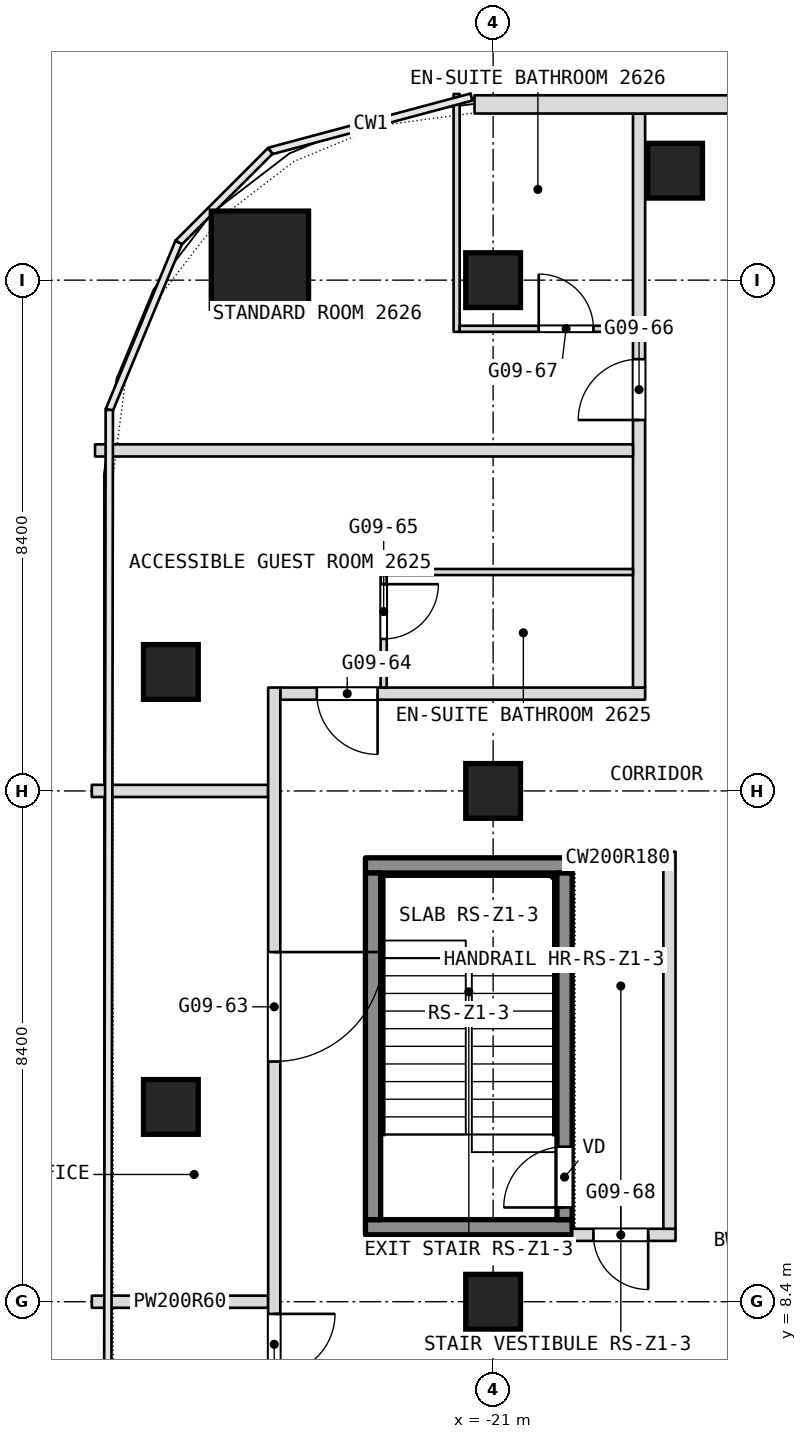
"""IFC4 building model, lengths in metres.
Left out: names, types, materials, properties, quantities, classifications, styles, units other than length and angle.
Written with IfcOpenShell. Run it as: python <this file> out.ifc"""

import sys

from ifc_helpers import new_model, si_unit, direction, frame, frame_2d, origin, origin_2d, place, context, subcontext, project, spatial, rectangle, extrude, element, fill, save


model = new_model("IFC4")
c1 = context("Model", 3, precision=1e-05, world=origin(), true_north=direction((0.0, 1.0)))
c2 = subcontext(c1, "Body", "Model", "MODEL_VIEW")
j1 = project(units=[si_unit("LENGTHUNIT", "METRE"), si_unit("PLANEANGLEUNIT", "RADIAN")], contexts=[c1])
p1 = place(None, origin())
s1 = spatial("IfcSite", under=j1, at=p1, CompositionType="ELEMENT")
p2 = place(p1, origin())
s2 = spatial("IfcBuilding", under=s1, at=p2, CompositionType="ELEMENT")
p3 = place(p2, frame((0.0, 0.0, 119.3)))
s3 = spatial("IfcBuildingStorey", under=s2, at=p3, CompositionType="ELEMENT", Elevation=119.3)
p4 = place(p3, frame((-24.835, 25.535, 0.0), z_axis=(0.0, 0.0, 1.0), x_axis=(1.0, 0.0, 0.0)))
e1 = element("IfcColumn", 1, at=p4, inside=s3, PredefinedType="COLUMN", context=c2, shape_type="SweptSolid", body=[
    extrude(rectangle(XDim=1.6, YDim=1.6, at=origin_2d()), origin(), (0.0, 0.0, 1.0), 3.6),
])
for number, where, z_axis, x_axis in (
    (2, (-21.0, 8.4, 0.0), (0.0, 0.0, 1.0), (1.0, 0.0, 0.0)),
    (3, (-21.0, 16.8, 0.0), (0.0, 0.0, 1.0), (1.0, 0.0, 0.0)),
    (4, (-21.0, 25.2, 0.0), (0.0, 0.0, 1.0), (1.0, 0.0, 0.0)),
    (5, (-26.3, 11.603, 0.0), (0.0, 0.0, 1.0), (1.0, 0.0, 0.0)),
    (6, (-26.3, 18.756, 0.0), (0.0, 0.0, 1.0), (1.0, 0.0, 0.0)),
    (7, (-18.007, 27.0, 0.0), (0.0, 0.0, 1.0), (1.0, 0.0, 0.0)),
):
    element("IfcColumn", number, at=place(p3, frame(where, z_axis=z_axis, x_axis=x_axis)), inside=s3, PredefinedType="COLUMN", context=c2, shape_type="SweptSolid", body=[
        extrude(rectangle(XDim=0.9, YDim=0.9, at=origin_2d()), origin(), (0.0, 0.0, 1.0), 3.6),
    ])
p5 = place(p3, frame((-27.6, 8.4, 0.0), z_axis=(0.0, 0.0, 1.0), x_axis=(1.0, 0.0, 0.0)))
e8 = element("IfcWall", 8, at=p5, inside=s3, PredefinedType="PARTITIONING", context=c2, shape_type="SweptSolid", body=[
    extrude(rectangle(XDim=2.9, YDim=0.2, at=frame_2d((1.45, 0.0))), origin(), (0.0, 0.0, 1.0), 2.89),
])
p6 = place(p3, frame((-19.7, 9.5, 0.0), z_axis=(0.0, 0.0, 1.0), x_axis=(1.0, 0.0, 0.0)))
e9 = element("IfcWall", 9, at=p6, inside=s3, PredefinedType="PARTITIONING", context=c2, shape_type="SweptSolid", body=[
    extrude(rectangle(XDim=1.7, YDim=0.2, at=frame_2d((0.85, 0.0))), origin(), (0.0, 0.0, 1.0), 3.34),
])
p7 = place(p6, frame((0.35, 0.0, 0.0)))
e10 = element("IfcOpeningElement", 10, at=p7, cuts=e9, PredefinedType="OPENING", context=c2, shape_type="SweptSolid", body=[
    extrude(rectangle(XDim=0.9, YDim=2.1, at=frame_2d((0.45, 1.05))), frame((0.0, 0.1, 0.0), z_axis=(0.0, -1.0, 0.0), x_axis=(1.0, 0.0, 0.0)), (0.0, 0.0, 1.0), 0.2),
])
p8 = place(p3, frame((-19.7, 15.7, 0.0), z_axis=(0.0, 0.0, 1.0), x_axis=(1.0, 0.0, 0.0)))
e11 = element("IfcWall", 11, at=p8, inside=s3, PredefinedType="PARTITIONING", context=c2, shape_type="SweptSolid", body=[
    extrude(rectangle(XDim=1.5, YDim=0.2, at=frame_2d((0.75, 0.0))), origin(), (0.0, 0.0, 1.0), 3.34),
])
p9 = place(p3, frame((-27.6, 16.8, 0.0), z_axis=(0.0, 0.0, 1.0), x_axis=(1.0, 0.0, 0.0)))
e12 = element("IfcWall", 12, at=p9, inside=s3, PredefinedType="PARTITIONING", context=c2, shape_type="SweptSolid", body=[
    extrude(rectangle(XDim=2.9, YDim=0.2, at=frame_2d((1.45, 0.0))), origin(), (0.0, 0.0, 1.0), 2.89),
])
p10 = place(p3, frame((-18.1, 9.6, 0.0), z_axis=(0.0, 0.0, 1.0), x_axis=(0.0, 1.0, 0.0)))
e13 = element("IfcWall", 13, at=p10, inside=s3, PredefinedType="PARTITIONING", context=c2, shape_type="SweptSolid", body=[
    extrude(rectangle(XDim=6.2, YDim=0.2, at=frame_2d((3.1, 0.0))), origin(), (0.0, 0.0, 1.0), 3.34),
])
p11 = place(p3, frame((-24.5, 18.4, 0.0), z_axis=(0.0, 0.0, 1.0), x_axis=(1.0, 0.0, 0.0)))
e14 = element("IfcWall", 14, at=p11, inside=s3, PredefinedType="PARTITIONING", context=c2, shape_type="SweptSolid", body=[
    extrude(rectangle(XDim=6.0, YDim=0.2, at=frame_2d((3.0, 0.0))), origin(), (0.0, 0.0, 1.0), 3.34),
])
p12 = place(p11, frame((0.6, 0.0, 0.0)))
e15 = element("IfcOpeningElement", 15, at=p12, cuts=e14, PredefinedType="OPENING", context=c2, shape_type="SweptSolid", body=[
    extrude(rectangle(XDim=1.0, YDim=2.1, at=frame_2d((0.5, 1.05))), frame((0.0, 0.1, 0.0), z_axis=(0.0, -1.0, 0.0), x_axis=(1.0, 0.0, 0.0)), (0.0, 0.0, 1.0), 0.2),
])
p13 = place(p3, frame((-18.6, 18.5, 0.0), z_axis=(0.0, 0.0, 1.0), x_axis=(0.0, 1.0, 0.0)))
e16 = element("IfcWall", 16, at=p13, inside=s3, PredefinedType="PARTITIONING", context=c2, shape_type="SweptSolid", body=[
    extrude(rectangle(XDim=9.44, YDim=0.2, at=frame_2d((4.72, 0.0))), origin(), (0.0, 0.0, 1.0), 3.34),
])
p14 = place(p13, frame((4.4, 0.0, 0.0)))
e17 = element("IfcOpeningElement", 17, at=p14, cuts=e16, PredefinedType="OPENING", context=c2, shape_type="SweptSolid", body=[
    extrude(rectangle(XDim=1.0, YDim=2.1, at=frame_2d((0.5, 1.05))), frame((0.0, 0.1, 0.0), z_axis=(0.0, -1.0, 0.0), x_axis=(1.0, 0.0, 0.0)), (0.0, 0.0, 1.0), 0.2),
])
p15 = place(p3, frame((-22.85, 20.4, 0.0), z_axis=(0.0, 0.0, 1.0), x_axis=(1.0, 0.0, 0.0)))
e18 = element("IfcWall", 18, at=p15, inside=s3, PredefinedType="PARTITIONING", context=c2, shape_type="SweptSolid", body=[
    extrude(rectangle(XDim=4.15, YDim=0.1, at=frame_2d((2.075, 0.0))), origin(), (0.0, 0.0, 1.0), 3.34),
])
p16 = place(p3, frame((-21.6, 24.35, 0.0), z_axis=(0.0, 0.0, 1.0), x_axis=(0.0, 1.0, 0.0)))
e19 = element("IfcWall", 19, at=p16, inside=s3, PredefinedType="PARTITIONING", context=c2, shape_type="SweptSolid", body=[
    extrude(rectangle(XDim=3.911, YDim=0.1, at=frame_2d((1.956, 0.0))), origin(), (0.0, 0.0, 1.0), 3.34),
])
p17 = place(p3, frame((-27.547, 22.4, 0.0), z_axis=(0.0, 0.0, 1.0), x_axis=(1.0, 0.0, 0.0)))
e20 = element("IfcWall", 20, at=p17, inside=s3, PredefinedType="PARTITIONING", context=c2, shape_type="SweptSolid", body=[
    extrude(rectangle(XDim=8.847, YDim=0.2, at=frame_2d((4.424, 0.0))), origin(), (0.0, 0.0, 1.0), 3.34),
])
p18 = place(p3, frame((-22.8, 18.5, 0.0), z_axis=(0.0, 0.0, 1.0), x_axis=(0.0, 1.0, 0.0)))
e21 = element("IfcWall", 21, at=p18, inside=s3, PredefinedType="PARTITIONING", context=c2, shape_type="SweptSolid", body=[
    extrude(rectangle(XDim=1.85, YDim=0.1, at=frame_2d((0.925, 0.0))), origin(), (0.0, 0.0, 1.0), 3.34),
])
p19 = place(p18, frame((0.8, 0.0, 0.0)))
e22 = element("IfcOpeningElement", 22, at=p19, cuts=e21, PredefinedType="OPENING", context=c2, shape_type="SweptSolid", body=[
    extrude(rectangle(XDim=0.9, YDim=2.1, at=frame_2d((0.45, 1.05))), frame((0.0, 0.05, 0.0), z_axis=(0.0, -1.0, 0.0), x_axis=(1.0, 0.0, 0.0)), (0.0, 0.0, 1.0), 0.1),
])
p20 = place(p3, frame((-21.55, 24.4, 0.0), z_axis=(0.0, 0.0, 1.0), x_axis=(1.0, 0.0, 0.0)))
e23 = element("IfcWall", 23, at=p20, inside=s3, PredefinedType="PARTITIONING", context=c2, shape_type="SweptSolid", body=[
    extrude(rectangle(XDim=2.85, YDim=0.1, at=frame_2d((1.425, 0.0))), origin(), (0.0, 0.0, 1.0), 3.34),
])
p21 = place(p20, frame((1.3, 0.0, 0.0)))
e24 = element("IfcOpeningElement", 24, at=p21, cuts=e23, PredefinedType="OPENING", context=c2, shape_type="SweptSolid", body=[
    extrude(rectangle(XDim=0.9, YDim=2.1, at=frame_2d((0.45, 1.05))), frame((0.0, 0.05, 0.0), z_axis=(0.0, -1.0, 0.0), x_axis=(1.0, 0.0, 0.0)), (0.0, 0.0, 1.0), 0.1),
])
p22 = place(p3, frame((-24.6, 6.9, 0.0), z_axis=(0.0, 0.0, 1.0), x_axis=(0.0, 1.0, 0.0)))
e25 = element("IfcWall", 25, at=p22, inside=s3, PredefinedType="PARTITIONING", context=c2, shape_type="SweptSolid", body=[
    extrude(rectangle(XDim=11.6, YDim=0.2, at=frame_2d((5.8, 0.0))), origin(), (0.0, 0.0, 1.0), 3.34),
])
p23 = place(p22, frame((5.45, 0.0, 0.0)))
e26 = element("IfcOpeningElement", 26, at=p23, cuts=e25, PredefinedType="OPENING", context=c2, shape_type="SweptSolid", body=[
    extrude(rectangle(XDim=1.8, YDim=2.1, at=frame_2d((0.9, 1.05))), frame((0.0, 0.1, 0.0), z_axis=(0.0, -1.0, 0.0), x_axis=(1.0, 0.0, 0.0)), (0.0, 0.0, 1.0), 0.2),
])
p24 = place(p22, frame((0.3, 0.0, 0.0)))
e27 = element("IfcOpeningElement", 27, at=p24, cuts=e25, PredefinedType="OPENING", context=c2, shape_type="SweptSolid", body=[
    extrude(rectangle(XDim=1.0, YDim=2.1, at=frame_2d((0.5, 1.05))), frame((0.0, 0.1, 0.0), z_axis=(0.0, -1.0, 0.0), x_axis=(1.0, 0.0, 0.0)), (0.0, 0.0, 1.0), 0.2),
])
p25 = place(p3, frame((21.306, 28.09, 0.0), z_axis=(0.0, 0.0, 1.0), x_axis=(-1.0, 0.0, 0.0)))
e28 = element("IfcWall", 28, at=p25, inside=s3, PredefinedType="NOTDEFINED", context=c2, shape_type="SweptSolid", body=[
    extrude(rectangle(XDim=42.612, YDim=0.3, at=frame_2d((21.306, 0.0))), origin(), (0.0, 0.0, 1.0), 3.6),
])
p26 = place(p25, frame((5.406, 0.0, 0.9)))
e29 = element("IfcOpeningElement", 29, at=p26, cuts=e28, PredefinedType="OPENING", context=c2, shape_type="SweptSolid", body=[
    extrude(rectangle(XDim=2.4, YDim=2.1, at=frame_2d((1.2, 1.05))), frame((0.0, 0.15, 0.0), z_axis=(0.0, -1.0, 0.0), x_axis=(1.0, 0.0, 0.0)), (0.0, 0.0, 1.0), 0.3),
])
p27 = place(p25, frame((9.606, 0.0, 0.9)))
e30 = element("IfcOpeningElement", 30, at=p27, cuts=e28, PredefinedType="OPENING", context=c2, shape_type="SweptSolid", body=[
    extrude(rectangle(XDim=2.4, YDim=2.1, at=frame_2d((1.2, 1.05))), frame((0.0, 0.15, 0.0), z_axis=(0.0, -1.0, 0.0), x_axis=(1.0, 0.0, 0.0)), (0.0, 0.0, 1.0), 0.3),
])
p28 = place(p25, frame((13.806, 0.0, 0.9)))
e31 = element("IfcOpeningElement", 31, at=p28, cuts=e28, PredefinedType="OPENING", context=c2, shape_type="SweptSolid", body=[
    extrude(rectangle(XDim=2.4, YDim=2.1, at=frame_2d((1.2, 1.05))), frame((0.0, 0.15, 0.0), z_axis=(0.0, -1.0, 0.0), x_axis=(1.0, 0.0, 0.0)), (0.0, 0.0, 1.0), 0.3),
])
p29 = place(p25, frame((18.006, 0.0, 0.9)))
e32 = element("IfcOpeningElement", 32, at=p29, cuts=e28, PredefinedType="OPENING", context=c2, shape_type="SweptSolid", body=[
    extrude(rectangle(XDim=2.4, YDim=2.1, at=frame_2d((1.2, 1.05))), frame((0.0, 0.15, 0.0), z_axis=(0.0, -1.0, 0.0), x_axis=(1.0, 0.0, 0.0)), (0.0, 0.0, 1.0), 0.3),
])
p30 = place(p25, frame((22.206, 0.0, 0.9)))
e33 = element("IfcOpeningElement", 33, at=p30, cuts=e28, PredefinedType="OPENING", context=c2, shape_type="SweptSolid", body=[
    extrude(rectangle(XDim=2.4, YDim=2.1, at=frame_2d((1.2, 1.05))), frame((0.0, 0.15, 0.0), z_axis=(0.0, -1.0, 0.0), x_axis=(1.0, 0.0, 0.0)), (0.0, 0.0, 1.0), 0.3),
])
p31 = place(p25, frame((26.406, 0.0, 0.9)))
e34 = element("IfcOpeningElement", 34, at=p31, cuts=e28, PredefinedType="OPENING", context=c2, shape_type="SweptSolid", body=[
    extrude(rectangle(XDim=2.4, YDim=2.1, at=frame_2d((1.2, 1.05))), frame((0.0, 0.15, 0.0), z_axis=(0.0, -1.0, 0.0), x_axis=(1.0, 0.0, 0.0)), (0.0, 0.0, 1.0), 0.3),
])
p32 = place(p25, frame((30.606, 0.0, 0.9)))
e35 = element("IfcOpeningElement", 35, at=p32, cuts=e28, PredefinedType="OPENING", context=c2, shape_type="SweptSolid", body=[
    extrude(rectangle(XDim=2.4, YDim=2.1, at=frame_2d((1.2, 1.05))), frame((0.0, 0.15, 0.0), z_axis=(0.0, -1.0, 0.0), x_axis=(1.0, 0.0, 0.0)), (0.0, 0.0, 1.0), 0.3),
])
p33 = place(p25, frame((34.806, 0.0, 0.9)))
e36 = element("IfcOpeningElement", 36, at=p33, cuts=e28, PredefinedType="OPENING", context=c2, shape_type="SweptSolid", body=[
    extrude(rectangle(XDim=2.4, YDim=2.1, at=frame_2d((1.2, 1.05))), frame((0.0, 0.15, 0.0), z_axis=(0.0, -1.0, 0.0), x_axis=(1.0, 0.0, 0.0)), (0.0, 0.0, 1.0), 0.3),
])
for number, where, z_axis, x_axis in (
    (37, (-23.1, 9.625, 0.1), (0.0, 0.0, 1.0), (1.0, 0.0, 0.0)),
    (38, (-23.1, 15.575, 0.1), (0.0, 0.0, 1.0), (1.0, 0.0, 0.0)),
):
    element("IfcWall", number, at=place(p3, frame(where, z_axis=z_axis, x_axis=x_axis)), inside=s3, PredefinedType="SHEAR", context=c2, shape_type="SweptSolid", body=[
        extrude(rectangle(XDim=3.4, YDim=0.25, at=frame_2d((1.7, 0.0))), origin(), (0.0, 0.0, 1.0), 3.6),
    ])
p34 = place(p3, frame((-22.975, 9.75, 0.1), z_axis=(0.0, 0.0, 1.0), x_axis=(0.0, 1.0, 0.0)))
e39 = element("IfcWall", 39, at=p34, inside=s3, PredefinedType="SHEAR", context=c2, shape_type="SweptSolid", body=[
    extrude(rectangle(XDim=5.7, YDim=0.25, at=frame_2d((2.85, 0.0))), origin(), (0.0, 0.0, 1.0), 3.6),
])
p35 = place(p3, frame((-19.825, 9.75, 0.1), z_axis=(0.0, 0.0, 1.0), x_axis=(0.0, 1.0, 0.0)))
e40 = element("IfcWall", 40, at=p35, inside=s3, PredefinedType="SHEAR", context=c2, shape_type="SweptSolid", body=[
    extrude(rectangle(XDim=5.7, YDim=0.25, at=frame_2d((2.85, 0.0))), origin(), (0.0, 0.0, 1.0), 3.6),
])
p36 = place(p35, frame((0.2, 0.0, 0.0)))
e41 = element("IfcOpeningElement", 41, at=p36, cuts=e40, PredefinedType="OPENING", context=c2, shape_type="SweptSolid", body=[
    extrude(rectangle(XDim=1.0, YDim=2.1, at=frame_2d((0.5, 1.05))), frame((0.0, 0.125, 0.0), z_axis=(0.0, -1.0, 0.0), x_axis=(1.0, 0.0, 0.0)), (0.0, 0.0, 1.0), 0.25),
])
p37 = place(p7, origin())
e42 = element("IfcDoor", 42, at=p37, inside=s3, OperationType="SINGLE_SWING_RIGHT", PredefinedType="DOOR", context=c2, shape_type="SweptSolid", body=[
    extrude(rectangle(XDim=0.9, YDim=2.1, at=frame_2d((0.45, 1.05))), frame((0.0, 0.025, 0.0), z_axis=(0.0, -1.0, 0.0), x_axis=(1.0, 0.0, 0.0)), (0.0, 0.0, 1.0), 0.05),
])
fill(e10, e42)
p38 = place(p12, origin())
e43 = element("IfcDoor", 43, at=p38, inside=s3, OperationType="SINGLE_SWING_RIGHT", PredefinedType="DOOR", context=c2, shape_type="SweptSolid", body=[
    extrude(rectangle(XDim=1.0, YDim=2.1, at=frame_2d((0.5, 1.05))), frame((0.0, 0.025, 0.0), z_axis=(0.0, -1.0, 0.0), x_axis=(1.0, 0.0, 0.0)), (0.0, 0.0, 1.0), 0.05),
])
fill(e15, e43)
p39 = place(p14, origin())
e44 = element("IfcDoor", 44, at=p39, inside=s3, OperationType="SINGLE_SWING_LEFT", PredefinedType="DOOR", context=c2, shape_type="SweptSolid", body=[
    extrude(rectangle(XDim=1.0, YDim=2.1, at=frame_2d((0.5, 1.05))), frame((0.0, 0.025, 0.0), z_axis=(0.0, -1.0, 0.0), x_axis=(1.0, 0.0, 0.0)), (0.0, 0.0, 1.0), 0.05),
])
fill(e17, e44)
p40 = place(p19, origin())
e45 = element("IfcDoor", 45, at=p40, inside=s3, OperationType="SINGLE_SWING_LEFT", PredefinedType="DOOR", context=c2, shape_type="SweptSolid", body=[
    extrude(rectangle(XDim=0.9, YDim=2.1, at=frame_2d((0.45, 1.05))), frame((0.0, 0.025, 0.0), z_axis=(0.0, -1.0, 0.0), x_axis=(1.0, 0.0, 0.0)), (0.0, 0.0, 1.0), 0.05),
])
fill(e22, e45)
p41 = place(p21, origin())
e46 = element("IfcDoor", 46, at=p41, inside=s3, OperationType="SINGLE_SWING_LEFT", PredefinedType="DOOR", context=c2, shape_type="SweptSolid", body=[
    extrude(rectangle(XDim=0.9, YDim=2.1, at=frame_2d((0.45, 1.05))), frame((0.0, 0.025, 0.0), z_axis=(0.0, -1.0, 0.0), x_axis=(1.0, 0.0, 0.0)), (0.0, 0.0, 1.0), 0.05),
])
fill(e24, e46)
p42 = place(p23, origin())
e47 = element("IfcDoor", 47, at=p42, inside=s3, OperationType="DOUBLE_DOOR_SINGLE_SWING", PredefinedType="DOOR", context=c2, shape_type="SweptSolid", body=[
    extrude(rectangle(XDim=1.8, YDim=2.1, at=frame_2d((0.9, 1.05))), frame((0.0, 0.025, 0.0), z_axis=(0.0, -1.0, 0.0), x_axis=(1.0, 0.0, 0.0)), (0.0, 0.0, 1.0), 0.05),
])
fill(e26, e47)
p43 = place(p24, origin())
e48 = element("IfcDoor", 48, at=p43, inside=s3, OperationType="SINGLE_SWING_LEFT", PredefinedType="DOOR", context=c2, shape_type="SweptSolid", body=[
    extrude(rectangle(XDim=1.0, YDim=2.1, at=frame_2d((0.5, 1.05))), frame((0.0, 0.025, 0.0), z_axis=(0.0, -1.0, 0.0), x_axis=(1.0, 0.0, 0.0)), (0.0, 0.0, 1.0), 0.05),
])
fill(e27, e48)
p44 = place(p36, origin())
e49 = element("IfcDoor", 49, at=p44, inside=s3, OperationType="SINGLE_SWING_LEFT", PredefinedType="DOOR", context=c2, shape_type="SweptSolid", body=[
    extrude(rectangle(XDim=1.0, YDim=2.1, at=frame_2d((0.5, 1.05))), frame((0.0, 0.025, 0.0), z_axis=(0.0, -1.0, 0.0), x_axis=(1.0, 0.0, 0.0)), (0.0, 0.0, 1.0), 0.05),
])
fill(e41, e49)
save(model, sys.argv[1])
